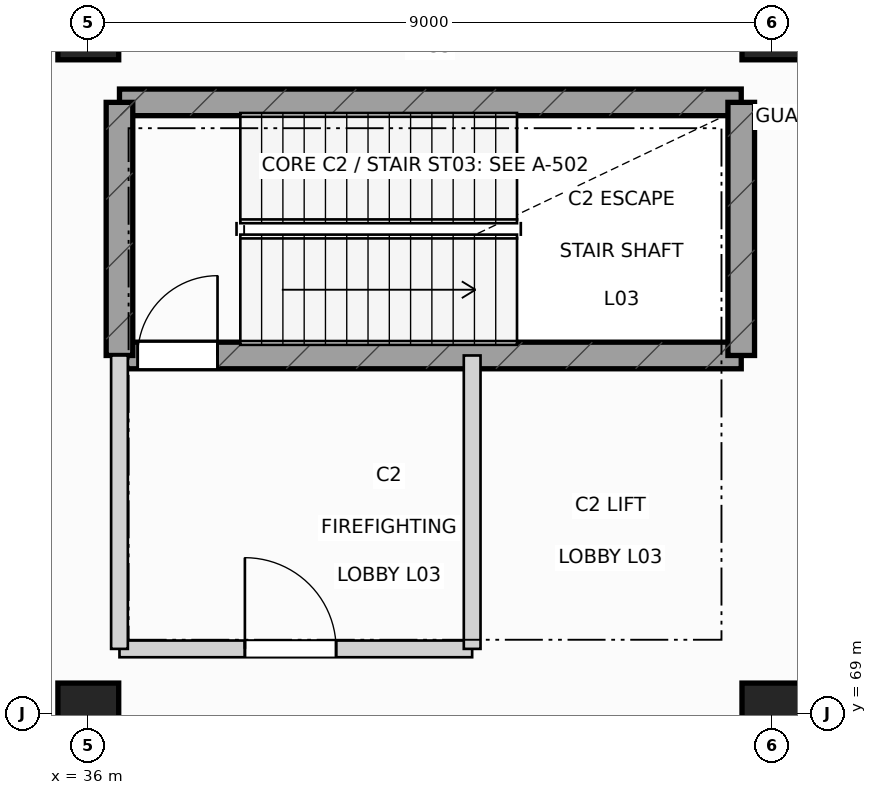
"""IFC4 building model, lengths in metres.
Left out: names, types, materials, properties, quantities, classifications, styles, units other than length and angle.
Written with IfcOpenShell. Run it as: python <this file> out.ifc"""

import sys

from ifc_helpers import new_model, si_unit, direction, frame, frame_2d, origin, origin_2d, place, context, subcontext, project, spatial, rectangle, extrude, element, fill, save


model = new_model("IFC4")
c1 = context("Model", 3, precision=1e-05, world=origin(), true_north=direction((0.0, 1.0)))
c2 = subcontext(c1, "Body", "Model", "MODEL_VIEW")
j1 = project(units=[si_unit("LENGTHUNIT", "METRE"), si_unit("PLANEANGLEUNIT", "RADIAN")], contexts=[c1])
p1 = place(None, origin())
s1 = spatial("IfcSite", under=j1, at=p1, CompositionType="ELEMENT")
p2 = place(p1, origin())
s2 = spatial("IfcBuilding", under=s1, at=p2, CompositionType="ELEMENT")
p3 = place(p2, frame((0.0, 0.0, 16.8)))
s3 = spatial("IfcBuildingStorey", under=s2, at=p3, CompositionType="ELEMENT", Elevation=16.8)
for number, where, z_axis, x_axis in (
    (1, (36.0, 69.0, 0.0), (0.0, 0.0, 1.0), (1.0, 0.0, 0.0)),
    (2, (36.0, 78.0, 0.0), (0.0, 0.0, 1.0), (1.0, 0.0, 0.0)),
    (3, (45.0, 69.0, 0.0), (0.0, 0.0, 1.0), (1.0, 0.0, 0.0)),
    (4, (45.0, 78.0, 0.0), (0.0, 0.0, 1.0), (1.0, 0.0, 0.0)),
):
    element("IfcColumn", number, at=place(p3, frame(where, z_axis=z_axis, x_axis=x_axis)), inside=s3, PredefinedType="COLUMN", context=c2, shape_type="SweptSolid", body=[
        extrude(rectangle(XDim=0.8, YDim=0.8, at=origin_2d()), origin(), (0.0, 0.0, 1.0), 4.8),
    ])
p4 = place(p3, frame((36.41, 73.71, 0.0), z_axis=(0.0, 0.0, 1.0), x_axis=(1.0, 0.0, 0.0)))
e5 = element("IfcWall", 5, at=p4, inside=s3, PredefinedType="SHEAR", context=c2, shape_type="SweptSolid", body=[
    extrude(rectangle(XDim=8.18, YDim=0.35, at=frame_2d((4.09, 0.0))), origin(), (0.0, 0.0, 1.0), 4.52),
])
p5 = place(p4, frame((0.24, 0.0, 0.0)))
e6 = element("IfcOpeningElement", 6, at=p5, cuts=e5, PredefinedType="OPENING", context=c2, shape_type="SweptSolid", body=[
    extrude(rectangle(XDim=1.05, YDim=2.18, at=frame_2d((0.525, 1.09))), frame((0.0, 0.185, 0.0), z_axis=(0.0, -1.0, 0.0), x_axis=(1.0, 0.0, 0.0)), (0.0, 0.0, 1.0), 0.37),
])
p6 = place(p3, frame((36.41, 77.04, 0.0), z_axis=(0.0, 0.0, 1.0), x_axis=(1.0, 0.0, 0.0)))
e7 = element("IfcWall", 7, at=p6, inside=s3, PredefinedType="SHEAR", context=c2, shape_type="SweptSolid", body=[
    extrude(rectangle(XDim=8.18, YDim=0.35, at=frame_2d((4.09, 0.0))), origin(), (0.0, 0.0, 1.0), 4.52),
])
for number, where, z_axis, x_axis in (
    (8, (36.41, 73.71, 0.0), (0.0, 0.0, 1.0), (0.0, 1.0, 0.0)),
    (9, (44.59, 73.71, 0.0), (0.0, 0.0, 1.0), (0.0, 1.0, 0.0)),
):
    element("IfcWall", number, at=place(p3, frame(where, z_axis=z_axis, x_axis=x_axis)), inside=s3, PredefinedType="SHEAR", context=c2, shape_type="SweptSolid", body=[
        extrude(rectangle(XDim=3.33, YDim=0.35, at=frame_2d((1.665, 0.0))), origin(), (0.0, 0.0, 1.0), 4.52),
    ])
p7 = place(p3, frame((36.41, 69.85, 0.0), z_axis=(0.0, 0.0, 1.0), x_axis=(1.0, 0.0, 0.0)))
e10 = element("IfcWall", 10, at=p7, inside=s3, PredefinedType="PARTITIONING", context=c2, shape_type="SweptSolid", body=[
    extrude(rectangle(XDim=4.64, YDim=0.22, at=frame_2d((2.32, 0.0))), origin(), (0.0, 0.0, 1.0), 3.835),
])
p8 = place(p7, frame((1.65, 0.0, 0.0)))
e11 = element("IfcOpeningElement", 11, at=p8, cuts=e10, PredefinedType="OPENING", context=c2, shape_type="SweptSolid", body=[
    extrude(rectangle(XDim=1.2, YDim=2.18, at=frame_2d((0.6, 1.09))), frame((0.0, 0.12, 0.0), z_axis=(0.0, -1.0, 0.0), x_axis=(1.0, 0.0, 0.0)), (0.0, 0.0, 1.0), 0.24),
])
p9 = place(p3, frame((36.41, 69.85, 0.0), z_axis=(0.0, 0.0, 1.0), x_axis=(0.0, 1.0, 0.0)))
e12 = element("IfcWall", 12, at=p9, inside=s3, PredefinedType="PARTITIONING", context=c2, shape_type="SweptSolid", body=[
    extrude(rectangle(XDim=3.86, YDim=0.22, at=frame_2d((1.93, 0.0))), origin(), (0.0, 0.0, 1.0), 3.835),
])
p10 = place(p3, frame((41.05, 69.85, 0.0), z_axis=(0.0, 0.0, 1.0), x_axis=(0.0, 1.0, 0.0)))
e13 = element("IfcWall", 13, at=p10, inside=s3, PredefinedType="PARTITIONING", context=c2, shape_type="SweptSolid", body=[
    extrude(rectangle(XDim=3.86, YDim=0.22, at=frame_2d((1.93, 0.0))), origin(), (0.0, 0.0, 1.0), 4.035),
])
p11 = place(p5, origin())
e14 = element("IfcDoor", 14, at=p11, inside=s3, OperationType="SINGLE_SWING_RIGHT", PredefinedType="DOOR", context=c2, shape_type="SweptSolid", body=[
    extrude(rectangle(XDim=1.05, YDim=2.18, at=frame_2d((0.525, 1.09))), frame((0.0, 0.025, 0.0), z_axis=(0.0, -1.0, 0.0), x_axis=(1.0, 0.0, 0.0)), (0.0, 0.0, 1.0), 0.05),
])
fill(e6, e14)
p12 = place(p8, origin())
e15 = element("IfcDoor", 15, at=p12, inside=s3, OperationType="SINGLE_SWING_LEFT", PredefinedType="DOOR", context=c2, shape_type="SweptSolid", body=[
    extrude(rectangle(XDim=1.2, YDim=2.18, at=frame_2d((0.6, 1.09))), frame((0.0, 0.025, 0.0), z_axis=(0.0, -1.0, 0.0), x_axis=(1.0, 0.0, 0.0)), (0.0, 0.0, 1.0), 0.05),
])
fill(e11, e15)
save(model, sys.argv[1])
